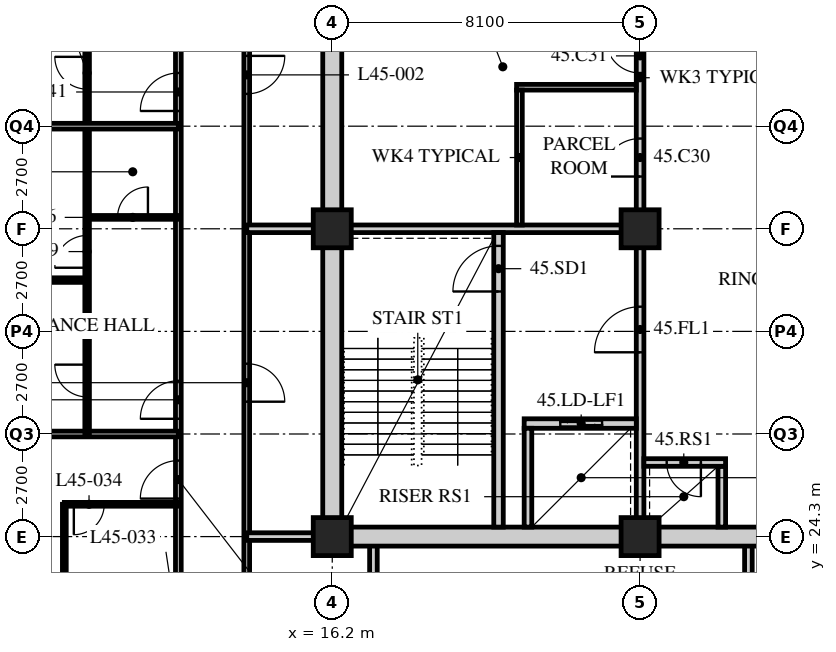
"""IFC4 building model, lengths in metres.
Left out: names, types, materials, properties, quantities, classifications, styles, units other than length and angle.
Written with IfcOpenShell. Run it as: python <this file> out.ifc"""

import sys

from ifc_helpers import new_model, si_unit, direction, frame, frame_2d, origin, origin_2d, place, context, subcontext, project, spatial, rectangle, hollow_rectangle, extrude, element, fill, save


model = new_model("IFC4")
c1 = context("Model", 3, precision=1e-05, world=origin(), true_north=direction((0.0, 1.0)))
c2 = subcontext(c1, "Body", "Model", "MODEL_VIEW")
j1 = project(units=[si_unit("LENGTHUNIT", "METRE"), si_unit("PLANEANGLEUNIT", "RADIAN")], contexts=[c1])
p1 = place(None, origin())
s1 = spatial("IfcSite", under=j1, at=p1, CompositionType="ELEMENT")
p2 = place(p1, origin())
s2 = spatial("IfcBuilding", under=s1, at=p2, CompositionType="ELEMENT")
p3 = place(p2, frame((0.0, 0.0, 177.6)))
s3 = spatial("IfcBuildingStorey", under=s2, at=p3, CompositionType="ELEMENT", Elevation=177.6)
for number, where, z_axis, x_axis in (
    (1, (16.2, 24.3, 0.0), (0.0, 0.0, 1.0), (1.0, 0.0, 0.0)),
    (2, (16.2, 32.4, 0.0), (0.0, 0.0, 1.0), (1.0, 0.0, 0.0)),
    (3, (24.3, 24.3, 0.0), (0.0, 0.0, 1.0), (1.0, 0.0, 0.0)),
    (4, (24.3, 32.4, 0.0), (0.0, 0.0, 1.0), (1.0, 0.0, 0.0)),
):
    element("IfcColumn", number, at=place(p3, frame(where, z_axis=z_axis, x_axis=x_axis)), inside=s3, PredefinedType="COLUMN", context=c2, shape_type="SweptSolid", body=[
        extrude(hollow_rectangle(XDim=1.0, YDim=1.0, WallThickness=0.1, at=origin_2d()), origin(), (0.0, 0.0, 1.0), 3.6),
    ])
p4 = place(p3, frame((12.15, 18.9, 0.0), z_axis=(0.0, 0.0, 1.0), x_axis=(0.0, 1.0, 0.0)))
e5 = element("IfcWall", 5, at=p4, inside=s3, PredefinedType="PARTITIONING", context=c2, shape_type="SweptSolid", body=[
    extrude(rectangle(XDim=24.3, YDim=0.15, at=frame_2d((12.15, 0.0))), origin(), (0.0, 0.0, 1.0), 3.39),
])
p5 = place(p4, frame((2.35, 0.0, 0.0)))
e6 = element("IfcOpeningElement", 6, at=p5, cuts=e5, PredefinedType="OPENING", context=c2, shape_type="SweptSolid", body=[
    extrude(rectangle(XDim=1.0, YDim=2.1, at=frame_2d((0.5, 1.05))), frame((0.0, 0.085, 0.0), z_axis=(0.0, -1.0, 0.0), x_axis=(1.0, 0.0, 0.0)), (0.0, 0.0, 1.0), 0.17),
])
p6 = place(p4, frame((6.4, 0.0, 0.0)))
e7 = element("IfcOpeningElement", 7, at=p6, cuts=e5, PredefinedType="OPENING", context=c2, shape_type="SweptSolid", body=[
    extrude(rectangle(XDim=1.0, YDim=2.1, at=frame_2d((0.5, 1.05))), frame((0.0, 0.085, 0.0), z_axis=(0.0, -1.0, 0.0), x_axis=(1.0, 0.0, 0.0)), (0.0, 0.0, 1.0), 0.17),
])
p7 = place(p4, frame((8.5, 0.0, 0.0)))
e8 = element("IfcOpeningElement", 8, at=p7, cuts=e5, PredefinedType="OPENING", context=c2, shape_type="SweptSolid", body=[
    extrude(rectangle(XDim=1.0, YDim=2.1, at=frame_2d((0.5, 1.05))), frame((0.0, 0.085, 0.0), z_axis=(0.0, -1.0, 0.0), x_axis=(1.0, 0.0, 0.0)), (0.0, 0.0, 1.0), 0.17),
])
p8 = place(p4, frame((16.6, 0.0, 0.0)))
e9 = element("IfcOpeningElement", 9, at=p8, cuts=e5, PredefinedType="OPENING", context=c2, shape_type="SweptSolid", body=[
    extrude(rectangle(XDim=1.0, YDim=2.1, at=frame_2d((0.5, 1.05))), frame((0.0, 0.085, 0.0), z_axis=(0.0, -1.0, 0.0), x_axis=(1.0, 0.0, 0.0)), (0.0, 0.0, 1.0), 0.17),
])
p9 = place(p3, frame((13.95, 40.5, 0.0), z_axis=(0.0, 0.0, 1.0), x_axis=(0.0, -1.0, 0.0)))
e10 = element("IfcWall", 10, at=p9, inside=s3, PredefinedType="PARTITIONING", context=c2, shape_type="SweptSolid", body=[
    extrude(rectangle(XDim=19.8, YDim=0.15, at=frame_2d((9.9, 0.0))), origin(), (0.0, 0.0, 1.0), 3.39),
])
p10 = place(p9, frame((11.65, 0.0, 0.0)))
e11 = element("IfcOpeningElement", 11, at=p10, cuts=e10, PredefinedType="OPENING", context=c2, shape_type="SweptSolid", body=[
    extrude(rectangle(XDim=1.0, YDim=2.1, at=frame_2d((0.5, 1.05))), frame((0.0, 0.085, 0.0), z_axis=(0.0, -1.0, 0.0), x_axis=(1.0, 0.0, 0.0)), (0.0, 0.0, 1.0), 0.17),
])
p11 = place(p9, frame((3.55, 0.0, 0.0)))
e12 = element("IfcOpeningElement", 12, at=p11, cuts=e10, PredefinedType="OPENING", context=c2, shape_type="SweptSolid", body=[
    extrude(rectangle(XDim=1.0, YDim=2.1, at=frame_2d((0.5, 1.05))), frame((0.0, 0.085, 0.0), z_axis=(0.0, -1.0, 0.0), x_axis=(1.0, 0.0, 0.0)), (0.0, 0.0, 1.0), 0.17),
])
p12 = place(p3, frame((13.95, 32.4, 0.0), z_axis=(0.0, 0.0, 1.0), x_axis=(1.0, 0.0, 0.0)))
e13 = element("IfcWall", 13, at=p12, inside=s3, PredefinedType="SOLIDWALL", context=c2, shape_type="SweptSolid", body=[
    extrude(rectangle(XDim=2.25, YDim=0.2, at=frame_2d((1.125, 0.0))), origin(), (0.0, 0.0, 1.0), 3.39),
])
for number, where, z_axis, x_axis in (
    (14, (17.283, 20.7, 0.0), (0.0, 0.0, 1.0), (0.0, 1.0, 0.0)),
    (15, (27.15, 20.7, 0.0), (0.0, 0.0, 1.0), (0.0, 1.0, 0.0)),
):
    element("IfcWall", number, at=place(p3, frame(where, z_axis=z_axis, x_axis=x_axis)), inside=s3, PredefinedType="SOLIDWALL", context=c2, shape_type="SweptSolid", body=[
        extrude(rectangle(XDim=3.6, YDim=0.2, at=frame_2d((1.8, 0.0))), origin(), (0.0, 0.0, 1.0), 3.39),
    ])
p13 = place(p3, frame((13.95, 24.3, 0.0), z_axis=(0.0, 0.0, 1.0), x_axis=(1.0, 0.0, 0.0)))
e16 = element("IfcWall", 16, at=p13, inside=s3, PredefinedType="SOLIDWALL", context=c2, shape_type="SweptSolid", body=[
    extrude(rectangle(XDim=2.25, YDim=0.2, at=frame_2d((1.125, 0.0))), origin(), (0.0, 0.0, 1.0), 3.39),
])
p14 = place(p3, frame((9.15, 22.95, 0.0), z_axis=(0.0, 0.0, 1.0), x_axis=(0.0, 1.0, 0.0)))
e17 = element("IfcWall", 17, at=p14, inside=s3, PredefinedType="PARTITIONING", context=c2, shape_type="SweptSolid", body=[
    extrude(rectangle(XDim=2.2, YDim=0.1, at=frame_2d((1.1, 0.0))), origin(), (0.0, 0.0, 1.0), 3.39),
])
p15 = place(p3, frame((12.15, 25.15, 0.0), z_axis=(0.0, 0.0, 1.0), x_axis=(-1.0, 0.0, 0.0)))
e18 = element("IfcWall", 18, at=p15, inside=s3, PredefinedType="PARTITIONING", context=c2, shape_type="SweptSolid", body=[
    extrude(rectangle(XDim=3.0, YDim=0.1, at=frame_2d((1.5, 0.0))), origin(), (0.0, 0.0, 1.0), 3.39),
])
p16 = place(p15, frame((1.95, 0.0, 0.0)))
e19 = element("IfcOpeningElement", 19, at=p16, cuts=e18, PredefinedType="OPENING", context=c2, shape_type="SweptSolid", body=[
    extrude(rectangle(XDim=0.8, YDim=2.1, at=frame_2d((0.4, 1.05))), frame((0.0, 0.06, 0.0), z_axis=(0.0, -1.0, 0.0), x_axis=(1.0, 0.0, 0.0)), (0.0, 0.0, 1.0), 0.12),
])
p17 = place(p3, frame((12.15, 27.0, 0.0), z_axis=(0.0, 0.0, 1.0), x_axis=(-1.0, 0.0, 0.0)))
e20 = element("IfcWall", 20, at=p17, inside=s3, PredefinedType="PARTITIONING", context=c2, shape_type="SweptSolid", body=[
    extrude(rectangle(XDim=11.85, YDim=0.15, at=frame_2d((5.925, 0.0))), origin(), (0.0, 0.0, 1.0), 2.778),
])
p18 = place(p3, frame((9.75, 27.0, 0.0), z_axis=(0.0, 0.0, 1.0), x_axis=(0.0, 1.0, 0.0)))
e21 = element("IfcWall", 21, at=p18, inside=s3, PredefinedType="PARTITIONING", context=c2, shape_type="SweptSolid", body=[
    extrude(rectangle(XDim=16.2, YDim=0.12, at=frame_2d((8.1, 0.0))), origin(), (0.0, 0.0, 1.0), 3.39),
])
p19 = place(p18, frame((0.975, 0.0, 0.0)))
e22 = element("IfcOpeningElement", 22, at=p19, cuts=e21, PredefinedType="OPENING", context=c2, shape_type="SweptSolid", body=[
    extrude(rectangle(XDim=0.85, YDim=2.1, at=frame_2d((0.425, 1.05))), frame((0.0, 0.07, 0.0), z_axis=(0.0, -1.0, 0.0), x_axis=(1.0, 0.0, 0.0)), (0.0, 0.0, 1.0), 0.14),
])
p20 = place(p18, frame((4.375, 0.0, 0.0)))
e23 = element("IfcOpeningElement", 23, at=p20, cuts=e21, PredefinedType="OPENING", context=c2, shape_type="SweptSolid", body=[
    extrude(rectangle(XDim=0.85, YDim=2.1, at=frame_2d((0.425, 1.05))), frame((0.0, 0.07, 0.0), z_axis=(0.0, -1.0, 0.0), x_axis=(1.0, 0.0, 0.0)), (0.0, 0.0, 1.0), 0.14),
])
p21 = place(p18, frame((9.075, 0.0, 0.0)))
e24 = element("IfcOpeningElement", 24, at=p21, cuts=e21, PredefinedType="OPENING", context=c2, shape_type="SweptSolid", body=[
    extrude(rectangle(XDim=0.85, YDim=2.1, at=frame_2d((0.425, 1.05))), frame((0.0, 0.07, 0.0), z_axis=(0.0, -1.0, 0.0), x_axis=(1.0, 0.0, 0.0)), (0.0, 0.0, 1.0), 0.14),
])
p22 = place(p18, frame((12.475, 0.0, 0.0)))
e25 = element("IfcOpeningElement", 25, at=p22, cuts=e21, PredefinedType="OPENING", context=c2, shape_type="SweptSolid", body=[
    extrude(rectangle(XDim=0.85, YDim=2.1, at=frame_2d((0.425, 1.05))), frame((0.0, 0.07, 0.0), z_axis=(0.0, -1.0, 0.0), x_axis=(1.0, 0.0, 0.0)), (0.0, 0.0, 1.0), 0.14),
])
p23 = place(p3, frame((12.15, 32.7, 0.0), z_axis=(0.0, 0.0, 1.0), x_axis=(-1.0, 0.0, 0.0)))
e26 = element("IfcWall", 26, at=p23, inside=s3, PredefinedType="PARTITIONING", context=c2, shape_type="SweptSolid", body=[
    extrude(rectangle(XDim=2.4, YDim=0.1, at=frame_2d((1.2, 0.0))), origin(), (0.0, 0.0, 1.0), 3.39),
])
p24 = place(p23, frame((0.8, 0.0, 0.0)))
e27 = element("IfcOpeningElement", 27, at=p24, cuts=e26, PredefinedType="OPENING", context=c2, shape_type="SweptSolid", body=[
    extrude(rectangle(XDim=0.8, YDim=2.1, at=frame_2d((0.4, 1.05))), frame((0.0, 0.06, 0.0), z_axis=(0.0, -1.0, 0.0), x_axis=(1.0, 0.0, 0.0)), (0.0, 0.0, 1.0), 0.12),
])
p25 = place(p3, frame((9.75, 31.05, 0.0), z_axis=(0.0, 0.0, 1.0), x_axis=(-1.0, 0.0, 0.0)))
e28 = element("IfcWall", 28, at=p25, inside=s3, PredefinedType="PARTITIONING", context=c2, shape_type="SweptSolid", body=[
    extrude(rectangle(XDim=9.45, YDim=0.12, at=frame_2d((4.725, 0.0))), origin(), (0.0, 0.0, 1.0), 3.39),
])
p26 = place(p3, frame((12.15, 35.1, 0.0), z_axis=(0.0, 0.0, 1.0), x_axis=(-1.0, 0.0, 0.0)))
e29 = element("IfcWall", 29, at=p26, inside=s3, PredefinedType="PARTITIONING", context=c2, shape_type="SweptSolid", body=[
    extrude(rectangle(XDim=11.85, YDim=0.15, at=frame_2d((5.925, 0.0))), origin(), (0.0, 0.0, 1.0), 2.778),
])
p27 = place(p3, frame((15.95, 24.3, 0.0), z_axis=(0.0, 0.0, 1.0), x_axis=(1.0, 0.0, 0.0)))
e30 = element("IfcWall", 30, at=p27, inside=s3, PredefinedType="SOLIDWALL", context=c2, shape_type="SweptSolid", body=[
    extrude(rectangle(XDim=24.8, YDim=0.5, at=frame_2d((12.4, 0.0))), origin(), (0.0, 0.0, 1.0), 2.74),
])
p28 = place(p27, frame((11.5, 0.0, 0.0)))
e31 = element("IfcOpeningElement", 31, at=p28, cuts=e30, PredefinedType="OPENING", context=c2, shape_type="SweptSolid", body=[
    extrude(rectangle(XDim=1.8, YDim=2.4, at=frame_2d((0.9, 1.2))), frame((0.0, 0.26, 0.0), z_axis=(0.0, -1.0, 0.0), x_axis=(1.0, 0.0, 0.0)), (0.0, 0.0, 1.0), 0.52),
])
p29 = place(p3, frame((16.2, 24.55, 0.0), z_axis=(0.0, 0.0, 1.0), x_axis=(0.0, 1.0, 0.0)))
e32 = element("IfcWall", 32, at=p29, inside=s3, PredefinedType="SOLIDWALL", context=c2, shape_type="SweptSolid", body=[
    extrude(rectangle(XDim=15.7, YDim=0.5, at=frame_2d((7.85, 0.0))), origin(), (0.0, 0.0, 1.0), 2.778),
])
p30 = place(p3, frame((16.45, 32.4, 0.0), z_axis=(0.0, 0.0, 1.0), x_axis=(1.0, 0.0, 0.0)))
e33 = element("IfcWall", 33, at=p30, inside=s3, PredefinedType="SOLIDWALL", context=c2, shape_type="SweptSolid", body=[
    extrude(rectangle(XDim=7.95, YDim=0.2, at=frame_2d((3.975, 0.0))), origin(), (0.0, 0.0, 1.0), 2.778),
])
p31 = place(p3, frame((24.3, 24.55, 0.0), z_axis=(0.0, 0.0, 1.0), x_axis=(0.0, 1.0, 0.0)))
e34 = element("IfcWall", 34, at=p31, inside=s3, PredefinedType="SOLIDWALL", context=c2, shape_type="SweptSolid", body=[
    extrude(rectangle(XDim=7.75, YDim=0.2, at=frame_2d((3.875, 0.0))), origin(), (0.0, 0.0, 1.0), 2.778),
])
p32 = place(p31, frame((4.6, 0.0, 0.0)))
e35 = element("IfcOpeningElement", 35, at=p32, cuts=e34, PredefinedType="OPENING", context=c2, shape_type="SweptSolid", body=[
    extrude(rectangle(XDim=1.2, YDim=2.1, at=frame_2d((0.6, 1.05))), frame((0.0, 0.11, 0.0), z_axis=(0.0, -1.0, 0.0), x_axis=(1.0, 0.0, 0.0)), (0.0, 0.0, 1.0), 0.22),
])
p33 = place(p3, frame((20.575, 24.55, 0.0), z_axis=(0.0, 0.0, 1.0), x_axis=(0.0, 1.0, 0.0)))
e36 = element("IfcWall", 36, at=p33, inside=s3, PredefinedType="SOLIDWALL", context=c2, shape_type="SweptSolid", body=[
    extrude(rectangle(XDim=7.75, YDim=0.25, at=frame_2d((3.875, 0.0))), origin(), (0.0, 0.0, 1.0), 3.39),
])
p34 = place(p33, frame((6.2, 0.0, 0.0)))
e37 = element("IfcOpeningElement", 37, at=p34, cuts=e36, PredefinedType="OPENING", context=c2, shape_type="SweptSolid", body=[
    extrude(rectangle(XDim=1.2, YDim=2.1, at=frame_2d((0.6, 1.05))), frame((0.0, 0.135, 0.0), z_axis=(0.0, -1.0, 0.0), x_axis=(1.0, 0.0, 0.0)), (0.0, 0.0, 1.0), 0.27),
])
p35 = place(p3, frame((21.25, 27.275, 0.0), z_axis=(0.0, 0.0, 1.0), x_axis=(1.0, 0.0, 0.0)))
e38 = element("IfcWall", 38, at=p35, inside=s3, PredefinedType="SOLIDWALL", context=c2, shape_type="SweptSolid", body=[
    extrude(rectangle(XDim=2.95, YDim=0.25, at=frame_2d((1.475, 0.0))), origin(), (0.0, 0.0, 1.0), 3.39),
])
p36 = place(p35, frame((0.95, 0.0, 0.0)))
e39 = element("IfcOpeningElement", 39, at=p36, cuts=e38, PredefinedType="OPENING", context=c2, shape_type="SweptSolid", body=[
    extrude(rectangle(XDim=1.1, YDim=2.4, at=frame_2d((0.55, 1.2))), frame((0.0, 0.135, 0.0), z_axis=(0.0, -1.0, 0.0), x_axis=(1.0, 0.0, 0.0)), (0.0, 0.0, 1.0), 0.27),
])
p37 = place(p3, frame((21.35, 24.55, 0.0), z_axis=(0.0, 0.0, 1.0), x_axis=(0.0, 1.0, 0.0)))
e40 = element("IfcWall", 40, at=p37, inside=s3, PredefinedType="SOLIDWALL", context=c2, shape_type="SweptSolid", body=[
    extrude(rectangle(XDim=2.6, YDim=0.2, at=frame_2d((1.3, 0.0))), origin(), (0.0, 0.0, 1.0), 3.39),
])
p38 = place(p3, frame((26.45, 24.55, 0.0), z_axis=(0.0, 0.0, 1.0), x_axis=(0.0, 1.0, 0.0)))
e41 = element("IfcWall", 41, at=p38, inside=s3, PredefinedType="SOLIDWALL", context=c2, shape_type="SweptSolid", body=[
    extrude(rectangle(XDim=1.6, YDim=0.2, at=frame_2d((0.8, 0.0))), origin(), (0.0, 0.0, 1.0), 3.39),
])
p39 = place(p3, frame((24.4, 26.25, 0.0), z_axis=(0.0, 0.0, 1.0), x_axis=(1.0, 0.0, 0.0)))
e42 = element("IfcWall", 42, at=p39, inside=s3, PredefinedType="SOLIDWALL", context=c2, shape_type="SweptSolid", body=[
    extrude(rectangle(XDim=2.15, YDim=0.2, at=frame_2d((1.075, 0.0))), origin(), (0.0, 0.0, 1.0), 3.39),
])
p40 = place(p39, frame((0.6, 0.0, 0.0)))
e43 = element("IfcOpeningElement", 43, at=p40, cuts=e42, PredefinedType="OPENING", context=c2, shape_type="SweptSolid", body=[
    extrude(rectangle(XDim=0.9, YDim=2.1, at=frame_2d((0.45, 1.05))), frame((0.0, 0.11, 0.0), z_axis=(0.0, -1.0, 0.0), x_axis=(1.0, 0.0, 0.0)), (0.0, 0.0, 1.0), 0.22),
])
p41 = place(p3, frame((24.3, 32.5, 0.0), z_axis=(0.0, 0.0, 1.0), x_axis=(0.0, 1.0, 0.0)))
e44 = element("IfcWall", 44, at=p41, inside=s3, PredefinedType="PARTITIONING", context=c2, shape_type="SweptSolid", body=[
    extrude(rectangle(XDim=7.75, YDim=0.2, at=frame_2d((3.875, 0.0))), origin(), (0.0, 0.0, 1.0), 2.778),
])
p42 = place(p41, frame((1.275, 0.0, 0.0)))
e45 = element("IfcOpeningElement", 45, at=p42, cuts=e44, PredefinedType="OPENING", context=c2, shape_type="SweptSolid", body=[
    extrude(rectangle(XDim=1.0, YDim=2.1, at=frame_2d((0.5, 1.05))), frame((0.0, 0.11, 0.0), z_axis=(0.0, -1.0, 0.0), x_axis=(1.0, 0.0, 0.0)), (0.0, 0.0, 1.0), 0.22),
])
p43 = place(p41, frame((4.0, 0.0, 0.0)))
e46 = element("IfcOpeningElement", 46, at=p43, cuts=e44, PredefinedType="OPENING", context=c2, shape_type="SweptSolid", body=[
    extrude(rectangle(XDim=0.9, YDim=2.1, at=frame_2d((0.45, 1.05))), frame((0.0, 0.11, 0.0), z_axis=(0.0, -1.0, 0.0), x_axis=(1.0, 0.0, 0.0)), (0.0, 0.0, 1.0), 0.22),
])
p44 = place(p41, frame((6.1, 0.0, 0.0)))
e47 = element("IfcOpeningElement", 47, at=p44, cuts=e44, PredefinedType="OPENING", context=c2, shape_type="SweptSolid", body=[
    extrude(rectangle(XDim=0.9, YDim=2.1, at=frame_2d((0.45, 1.05))), frame((0.0, 0.11, 0.0), z_axis=(0.0, -1.0, 0.0), x_axis=(1.0, 0.0, 0.0)), (0.0, 0.0, 1.0), 0.22),
])
p45 = place(p3, frame((21.05, 36.125, 0.0), z_axis=(0.0, 0.0, 1.0), x_axis=(1.0, 0.0, 0.0)))
e48 = element("IfcWall", 48, at=p45, inside=s3, PredefinedType="PARTITIONING", context=c2, shape_type="SweptSolid", body=[
    extrude(rectangle(XDim=3.15, YDim=0.15, at=frame_2d((1.575, 0.0))), origin(), (0.0, 0.0, 1.0), 3.39),
])
p46 = place(p3, frame((21.125, 32.5, 0.0), z_axis=(0.0, 0.0, 1.0), x_axis=(0.0, 1.0, 0.0)))
e49 = element("IfcWall", 49, at=p46, inside=s3, PredefinedType="PARTITIONING", context=c2, shape_type="SweptSolid", body=[
    extrude(rectangle(XDim=3.55, YDim=0.15, at=frame_2d((1.775, 0.0))), origin(), (0.0, 0.0, 1.0), 3.39),
])
p47 = place(p10, origin())
e50 = element("IfcDoor", 50, at=p47, inside=s3, OperationType="SINGLE_SWING_RIGHT", PredefinedType="DOOR", context=c2, shape_type="SweptSolid", body=[
    extrude(rectangle(XDim=1.0, YDim=2.1, at=frame_2d((0.5, 1.05))), frame((0.0, 0.025, 0.0), z_axis=(0.0, -1.0, 0.0), x_axis=(1.0, 0.0, 0.0)), (0.0, 0.0, 1.0), 0.05),
])
fill(e11, e50)
p48 = place(p11, origin())
e51 = element("IfcDoor", 51, at=p48, inside=s3, OperationType="SINGLE_SWING_LEFT", PredefinedType="DOOR", context=c2, shape_type="SweptSolid", body=[
    extrude(rectangle(XDim=1.0, YDim=2.1, at=frame_2d((0.5, 1.05))), frame((0.0, 0.025, 0.0), z_axis=(0.0, -1.0, 0.0), x_axis=(1.0, 0.0, 0.0)), (0.0, 0.0, 1.0), 0.05),
])
fill(e12, e51)
p49 = place(p16, origin())
e52 = element("IfcDoor", 52, at=p49, inside=s3, OperationType="SINGLE_SWING_RIGHT", PredefinedType="DOOR", context=c2, shape_type="SweptSolid", body=[
    extrude(rectangle(XDim=0.8, YDim=2.1, at=frame_2d((0.4, 1.05))), frame((0.0, 0.025, 0.0), z_axis=(0.0, -1.0, 0.0), x_axis=(1.0, 0.0, 0.0)), (0.0, 0.0, 1.0), 0.05),
])
fill(e19, e52)
p50 = place(p6, origin())
e53 = element("IfcDoor", 53, at=p50, inside=s3, OperationType="SINGLE_SWING_LEFT", PredefinedType="DOOR", context=c2, shape_type="SweptSolid", body=[
    extrude(rectangle(XDim=1.0, YDim=2.1, at=frame_2d((0.5, 1.05))), frame((0.0, 0.025, 0.0), z_axis=(0.0, -1.0, 0.0), x_axis=(1.0, 0.0, 0.0)), (0.0, 0.0, 1.0), 0.05),
])
fill(e7, e53)
p51 = place(p24, origin())
e54 = element("IfcDoor", 54, at=p51, inside=s3, OperationType="SINGLE_SWING_RIGHT", PredefinedType="DOOR", context=c2, shape_type="SweptSolid", body=[
    extrude(rectangle(XDim=0.8, YDim=2.1, at=frame_2d((0.4, 1.05))), frame((0.0, 0.025, 0.0), z_axis=(0.0, -1.0, 0.0), x_axis=(1.0, 0.0, 0.0)), (0.0, 0.0, 1.0), 0.05),
])
fill(e27, e54)
p52 = place(p7, origin())
e55 = element("IfcDoor", 55, at=p52, inside=s3, OperationType="SINGLE_SWING_LEFT", PredefinedType="DOOR", context=c2, shape_type="SweptSolid", body=[
    extrude(rectangle(XDim=1.0, YDim=2.1, at=frame_2d((0.5, 1.05))), frame((0.0, 0.025, 0.0), z_axis=(0.0, -1.0, 0.0), x_axis=(1.0, 0.0, 0.0)), (0.0, 0.0, 1.0), 0.05),
])
fill(e8, e55)
p53 = place(p19, origin())
e56 = element("IfcDoor", 56, at=p53, inside=s3, OperationType="SINGLE_SWING_RIGHT", PredefinedType="DOOR", context=c2, shape_type="SweptSolid", body=[
    extrude(rectangle(XDim=0.85, YDim=2.1, at=frame_2d((0.425, 1.05))), frame((0.0, 0.025, 0.0), z_axis=(0.0, -1.0, 0.0), x_axis=(1.0, 0.0, 0.0)), (0.0, 0.0, 1.0), 0.05),
])
fill(e22, e56)
p54 = place(p20, origin())
e57 = element("IfcDoor", 57, at=p54, inside=s3, OperationType="SINGLE_SWING_LEFT", PredefinedType="DOOR", context=c2, shape_type="SweptSolid", body=[
    extrude(rectangle(XDim=0.85, YDim=2.1, at=frame_2d((0.425, 1.05))), frame((0.0, 0.025, 0.0), z_axis=(0.0, -1.0, 0.0), x_axis=(1.0, 0.0, 0.0)), (0.0, 0.0, 1.0), 0.05),
])
fill(e23, e57)
p55 = place(p8, origin())
e58 = element("IfcDoor", 58, at=p55, inside=s3, OperationType="SINGLE_SWING_LEFT", PredefinedType="DOOR", context=c2, shape_type="SweptSolid", body=[
    extrude(rectangle(XDim=1.0, YDim=2.1, at=frame_2d((0.5, 1.05))), frame((0.0, 0.025, 0.0), z_axis=(0.0, -1.0, 0.0), x_axis=(1.0, 0.0, 0.0)), (0.0, 0.0, 1.0), 0.05),
])
fill(e9, e58)
p56 = place(p21, origin())
e59 = element("IfcDoor", 59, at=p56, inside=s3, OperationType="SINGLE_SWING_RIGHT", PredefinedType="DOOR", context=c2, shape_type="SweptSolid", body=[
    extrude(rectangle(XDim=0.85, YDim=2.1, at=frame_2d((0.425, 1.05))), frame((0.0, 0.025, 0.0), z_axis=(0.0, -1.0, 0.0), x_axis=(1.0, 0.0, 0.0)), (0.0, 0.0, 1.0), 0.05),
])
fill(e24, e59)
p57 = place(p42, origin())
e60 = element("IfcDoor", 60, at=p57, inside=s3, OperationType="SINGLE_SWING_LEFT", PredefinedType="DOOR", context=c2, shape_type="SweptSolid", body=[
    extrude(rectangle(XDim=1.0, YDim=2.1, at=frame_2d((0.5, 1.05))), frame((0.0, 0.025, 0.0), z_axis=(0.0, -1.0, 0.0), x_axis=(1.0, 0.0, 0.0)), (0.0, 0.0, 1.0), 0.05),
])
fill(e45, e60)
p58 = place(p43, origin())
e61 = element("IfcDoor", 61, at=p58, inside=s3, OperationType="SINGLE_SWING_RIGHT", PredefinedType="DOOR", context=c2, shape_type="SweptSolid", body=[
    extrude(rectangle(XDim=0.9, YDim=2.1, at=frame_2d((0.45, 1.05))), frame((0.0, 0.025, 0.0), z_axis=(0.0, -1.0, 0.0), x_axis=(1.0, 0.0, 0.0)), (0.0, 0.0, 1.0), 0.05),
])
fill(e46, e61)
p59 = place(p34, origin())
e62 = element("IfcDoor", 62, at=p59, inside=s3, OperationType="SINGLE_SWING_LEFT", PredefinedType="DOOR", context=c2, shape_type="SweptSolid", body=[
    extrude(rectangle(XDim=1.2, YDim=2.1, at=frame_2d((0.6, 1.05))), frame((0.0, 0.025, 0.0), z_axis=(0.0, -1.0, 0.0), x_axis=(1.0, 0.0, 0.0)), (0.0, 0.0, 1.0), 0.05),
])
fill(e37, e62)
p60 = place(p32, origin())
e63 = element("IfcDoor", 63, at=p60, inside=s3, OperationType="SINGLE_SWING_LEFT", PredefinedType="DOOR", context=c2, shape_type="SweptSolid", body=[
    extrude(rectangle(XDim=1.2, YDim=2.1, at=frame_2d((0.6, 1.05))), frame((0.0, 0.025, 0.0), z_axis=(0.0, -1.0, 0.0), x_axis=(1.0, 0.0, 0.0)), (0.0, 0.0, 1.0), 0.05),
])
fill(e35, e63)
p61 = place(p40, origin())
e64 = element("IfcDoor", 64, at=p61, inside=s3, OperationType="SINGLE_SWING_LEFT", PredefinedType="DOOR", context=c2, shape_type="SweptSolid", body=[
    extrude(rectangle(XDim=0.9, YDim=2.1, at=frame_2d((0.45, 1.05))), frame((0.0, 0.025, 0.0), z_axis=(0.0, -1.0, 0.0), x_axis=(1.0, 0.0, 0.0)), (0.0, 0.0, 1.0), 0.05),
])
fill(e43, e64)
p62 = place(p36, origin())
e65 = element("IfcDoor", 65, at=p62, inside=s3, OperationType="DOUBLE_DOOR_SLIDING", PredefinedType="DOOR", context=c2, shape_type="SweptSolid", body=[
    extrude(rectangle(XDim=1.1, YDim=2.4, at=frame_2d((0.55, 1.2))), frame((0.0, 0.025, 0.0), z_axis=(0.0, -1.0, 0.0), x_axis=(1.0, 0.0, 0.0)), (0.0, 0.0, 1.0), 0.05),
])
fill(e39, e65)
save(model, sys.argv[1])
